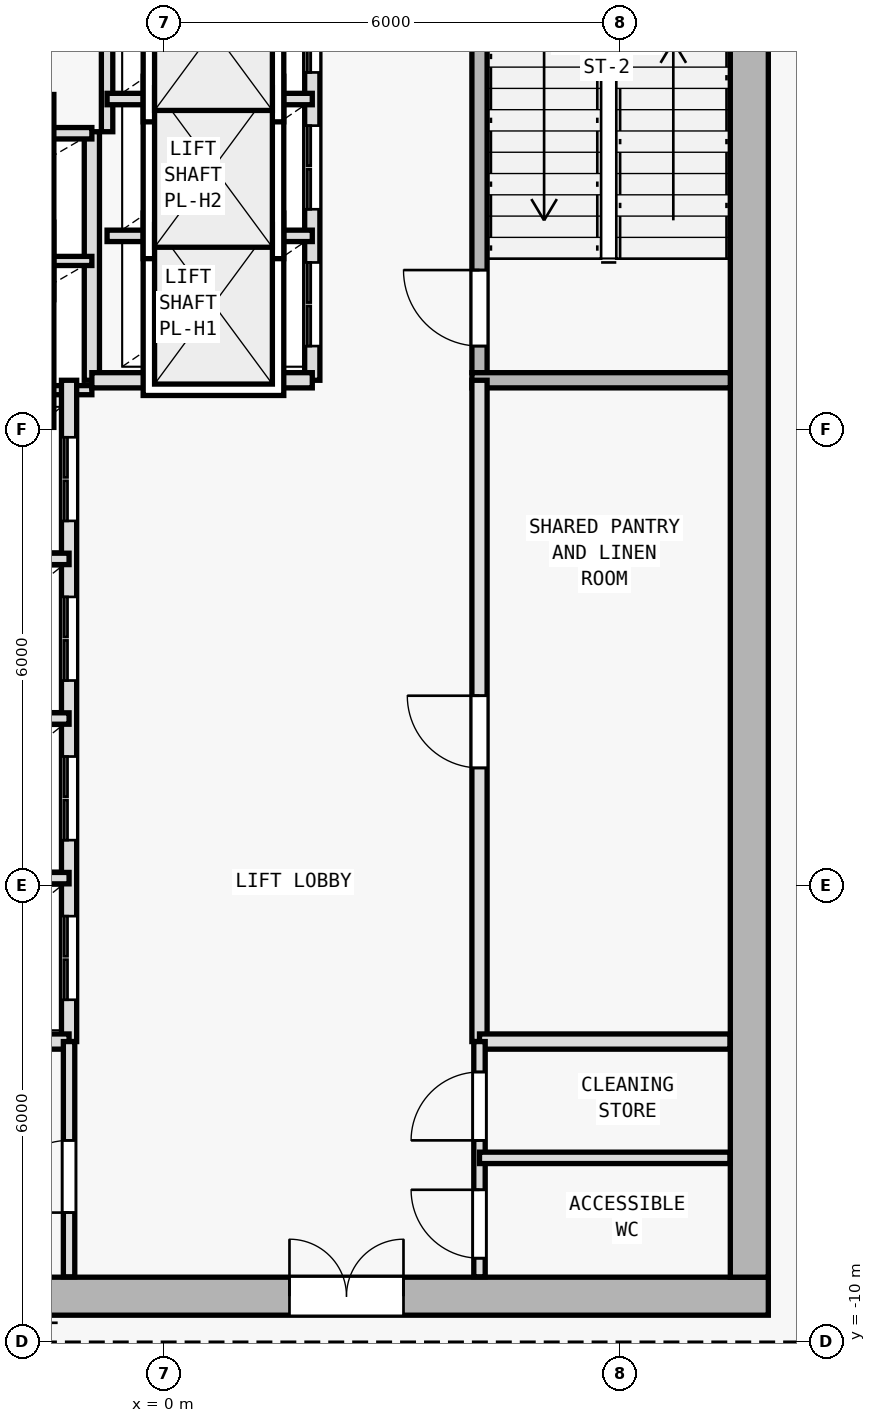
"""IFC4 building model, lengths in metres.
Left out: names, types, materials, properties, quantities, classifications, styles, units other than length and angle.
Written with IfcOpenShell. Run it as: python <this file> out.ifc"""

import sys

from ifc_helpers import new_model, si_unit, direction, frame, frame_2d, origin, origin_2d, place, context, subcontext, project, spatial, rectangle, i_section, extrude, element, fill, save


model = new_model("IFC4")
c1 = context("Model", 3, precision=1e-05, world=origin(), true_north=direction((0.0, 1.0)))
c2 = subcontext(c1, "Body", "Model", "MODEL_VIEW")
j1 = project(units=[si_unit("LENGTHUNIT", "METRE"), si_unit("PLANEANGLEUNIT", "RADIAN")], contexts=[c1])
p1 = place(None, origin())
s1 = spatial("IfcSite", under=j1, at=p1, CompositionType="ELEMENT")
p2 = place(p1, origin())
s2 = spatial("IfcBuilding", under=s1, at=p2, CompositionType="ELEMENT")
p3 = place(p2, frame((0.0, 0.0, 190.2)))
s3 = spatial("IfcBuildingStorey", under=s2, at=p3, CompositionType="ELEMENT", Elevation=190.2)
for number, where, z_axis, x_axis in (
    (1, (7.7, -9.4, 0.0), (0.0, 0.0, 1.0), (1.0, 0.0, 0.0)),
    (2, (0.0, -9.4, 0.0), (0.0, 0.0, 1.0), (1.0, 0.0, 0.0)),
    (3, (7.7, 0.4, 0.0), (0.0, 0.0, 1.0), (1.0, 0.0, 0.0)),
):
    element("IfcColumn", number, at=place(p3, frame(where, z_axis=z_axis, x_axis=x_axis)), inside=s3, PredefinedType="COLUMN", context=c2, shape_type="SweptSolid", body=[
        extrude(i_section(OverallWidth=0.404, OverallDepth=0.407, WebThickness=0.017, FlangeThickness=0.028, FilletRadius=0.015, at=origin_2d()), origin(), (0.0, 0.0, 1.0), 4.5),
    ])
p4 = place(p3, frame((-7.95, -9.4, 0.0), z_axis=(0.0, 0.0, 1.0), x_axis=(1.0, 0.0, 0.0)))
e4 = element("IfcWall", 4, at=p4, inside=s3, PredefinedType="SHEAR", context=c2, shape_type="SweptSolid", body=[
    extrude(rectangle(XDim=15.9, YDim=0.5, at=frame_2d((7.95, 0.0))), origin(), (0.0, 0.0, 1.0), 4.25),
])
p5 = place(p4, frame((9.6, 0.0, 0.0)))
e5 = element("IfcOpeningElement", 5, at=p5, cuts=e4, PredefinedType="OPENING", context=c2, shape_type="SweptSolid", body=[
    extrude(rectangle(XDim=1.5, YDim=2.2, at=frame_2d((0.75, 1.1))), frame((0.0, 0.26, 0.0), z_axis=(0.0, -1.0, 0.0), x_axis=(1.0, 0.0, 0.0)), (0.0, 0.0, 1.0), 0.52),
])
p6 = place(p3, frame((7.7, 9.95, 0.0), z_axis=(0.0, 0.0, 1.0), x_axis=(0.0, -1.0, 0.0)))
e6 = element("IfcWall", 6, at=p6, inside=s3, PredefinedType="SHEAR", context=c2, shape_type="SweptSolid", body=[
    extrude(rectangle(XDim=19.1, YDim=0.5, at=frame_2d((9.55, 0.0))), origin(), (0.0, 0.0, 1.0), 4.25),
])
p7 = place(p3, frame((4.15, 2.75, 0.0), z_axis=(0.0, 0.0, 1.0), x_axis=(0.0, 1.0, 0.0)))
e7 = element("IfcWall", 7, at=p7, inside=s3, PredefinedType="SOLIDWALL", context=c2, shape_type="SweptSolid", body=[
    extrude(rectangle(XDim=7.2, YDim=0.2, at=frame_2d((3.6, 0.0))), origin(), (0.0, 0.0, 1.0), 4.25),
])
p8 = place(p7, frame((0.35, 0.0, 0.0)))
e8 = element("IfcOpeningElement", 8, at=p8, cuts=e7, PredefinedType="OPENING", context=c2, shape_type="SweptSolid", body=[
    extrude(rectangle(XDim=1.0, YDim=2.15, at=frame_2d((0.5, 1.075))), frame((0.0, 0.11, 0.0), z_axis=(0.0, -1.0, 0.0), x_axis=(1.0, 0.0, 0.0)), (0.0, 0.0, 1.0), 0.22),
])
p9 = place(p3, frame((4.05, 2.65, 0.0), z_axis=(0.0, 0.0, 1.0), x_axis=(1.0, 0.0, 0.0)))
e9 = element("IfcWall", 9, at=p9, inside=s3, PredefinedType="SOLIDWALL", context=c2, shape_type="SweptSolid", body=[
    extrude(rectangle(XDim=3.4, YDim=0.2, at=frame_2d((1.7, 0.0))), origin(), (0.0, 0.0, 1.0), 4.25),
])
p10 = place(p3, frame((-0.95, 2.65, 0.0), z_axis=(0.0, 0.0, 1.0), x_axis=(0.0, 1.0, 0.0)))
e10 = element("IfcWall", 10, at=p10, inside=s3, PredefinedType="SOLIDWALL", context=c2, shape_type="SweptSolid", body=[
    extrude(rectangle(XDim=3.27, YDim=0.2, at=frame_2d((1.635, 0.0))), origin(), (0.0, 0.0, 1.0), 4.25),
])
for number, where, z_axis, x_axis in (
    (11, (-3.85, 2.52, 0.0), (0.0, 0.0, 1.0), (1.0, 0.0, 0.0)),
    (12, (-3.85, 4.22, 0.0), (0.0, 0.0, 1.0), (1.0, 0.0, 0.0)),
):
    element("IfcWall", number, at=place(p3, frame(where, z_axis=z_axis, x_axis=x_axis)), inside=s3, PredefinedType="PARTITIONING", context=c2, shape_type="SweptSolid", body=[
        extrude(rectangle(XDim=2.9, YDim=0.12, at=frame_2d((1.45, 0.0))), origin(), (0.0, 0.0, 1.0), 4.25),
    ])
p11 = place(p3, frame((-3.85, 5.9, 0.0), z_axis=(0.0, 0.0, 1.0), x_axis=(1.0, 0.0, 0.0)))
e13 = element("IfcWall", 13, at=p11, inside=s3, PredefinedType="PARTITIONING", context=c2, shape_type="SweptSolid", body=[
    extrude(rectangle(XDim=2.9, YDim=0.15, at=frame_2d((1.45, 0.0))), origin(), (0.0, 0.0, 1.0), 4.25),
])
p12 = place(p3, frame((4.15, -6.05, 0.0), z_axis=(0.0, 0.0, 1.0), x_axis=(0.0, 1.0, 0.0)))
e14 = element("IfcWall", 14, at=p12, inside=s3, PredefinedType="SOLIDWALL", context=c2, shape_type="SweptSolid", body=[
    extrude(rectangle(XDim=8.7, YDim=0.2, at=frame_2d((4.35, 0.0))), origin(), (0.0, 0.0, 1.0), 4.25),
])
p13 = place(p12, frame((3.6, 0.0, 0.0)))
e15 = element("IfcOpeningElement", 15, at=p13, cuts=e14, PredefinedType="OPENING", context=c2, shape_type="SweptSolid", body=[
    extrude(rectangle(XDim=0.95, YDim=2.1, at=frame_2d((0.475, 1.05))), frame((0.0, 0.11, 0.0), z_axis=(0.0, -1.0, 0.0), x_axis=(1.0, 0.0, 0.0)), (0.0, 0.0, 1.0), 0.22),
])
p14 = place(p3, frame((-1.25, -6.05, 0.0), z_axis=(0.0, 0.0, 1.0), x_axis=(0.0, 1.0, 0.0)))
e16 = element("IfcWall", 16, at=p14, inside=s3, PredefinedType="SOLIDWALL", context=c2, shape_type="SweptSolid", body=[
    extrude(rectangle(XDim=8.7, YDim=0.2, at=frame_2d((4.35, 0.0))), origin(), (0.0, 0.0, 1.0), 4.25),
])
p15 = place(p14, frame((0.55, 0.0, 0.0)))
e17 = element("IfcOpeningElement", 17, at=p15, cuts=e16, PredefinedType="OPENING", context=c2, shape_type="SweptSolid", body=[
    extrude(rectangle(XDim=1.1, YDim=2.15, at=frame_2d((0.55, 1.075))), frame((0.0, 0.11, 0.0), z_axis=(0.0, -1.0, 0.0), x_axis=(1.0, 0.0, 0.0)), (0.0, 0.0, 1.0), 0.22),
])
p16 = place(p14, frame((2.65, 0.0, 0.0)))
e18 = element("IfcOpeningElement", 18, at=p16, cuts=e16, PredefinedType="OPENING", context=c2, shape_type="SweptSolid", body=[
    extrude(rectangle(XDim=1.1, YDim=2.15, at=frame_2d((0.55, 1.075))), frame((0.0, 0.11, 0.0), z_axis=(0.0, -1.0, 0.0), x_axis=(1.0, 0.0, 0.0)), (0.0, 0.0, 1.0), 0.22),
])
p17 = place(p14, frame((4.75, 0.0, 0.0)))
e19 = element("IfcOpeningElement", 19, at=p17, cuts=e16, PredefinedType="OPENING", context=c2, shape_type="SweptSolid", body=[
    extrude(rectangle(XDim=1.1, YDim=2.15, at=frame_2d((0.55, 1.075))), frame((0.0, 0.11, 0.0), z_axis=(0.0, -1.0, 0.0), x_axis=(1.0, 0.0, 0.0)), (0.0, 0.0, 1.0), 0.22),
])
p18 = place(p14, frame((6.85, 0.0, 0.0)))
e20 = element("IfcOpeningElement", 20, at=p18, cuts=e16, PredefinedType="OPENING", context=c2, shape_type="SweptSolid", body=[
    extrude(rectangle(XDim=1.1, YDim=2.15, at=frame_2d((0.55, 1.075))), frame((0.0, 0.11, 0.0), z_axis=(0.0, -1.0, 0.0), x_axis=(1.0, 0.0, 0.0)), (0.0, 0.0, 1.0), 0.22),
])
for number, where, z_axis, x_axis in (
    (21, (-4.15, -3.9, 0.0), (0.0, 0.0, 1.0), (1.0, 0.0, 0.0)),
    (22, (-4.15, -1.8, 0.0), (0.0, 0.0, 1.0), (1.0, 0.0, 0.0)),
    (23, (-4.15, 0.3, 0.0), (0.0, 0.0, 1.0), (1.0, 0.0, 0.0)),
):
    element("IfcWall", number, at=place(p3, frame(where, z_axis=z_axis, x_axis=x_axis)), inside=s3, PredefinedType="PARTITIONING", context=c2, shape_type="SweptSolid", body=[
        extrude(rectangle(XDim=2.9, YDim=0.15, at=frame_2d((1.45, 0.0))), origin(), (0.0, 0.0, 1.0), 4.25),
    ])
p19 = place(p3, frame((1.95, 2.65, 0.0), z_axis=(0.0, 0.0, 1.0), x_axis=(0.0, 1.0, 0.0)))
e24 = element("IfcWall", 24, at=p19, inside=s3, PredefinedType="SOLIDWALL", context=c2, shape_type="SweptSolid", body=[
    extrude(rectangle(XDim=7.295, YDim=0.2, at=frame_2d((3.647, 0.0))), origin(), (0.0, 0.0, 1.0), 4.25),
])
p20 = place(p19, frame((0.45, 0.0, 0.0)))
e25 = element("IfcOpeningElement", 25, at=p20, cuts=e24, PredefinedType="OPENING", context=c2, shape_type="SweptSolid", body=[
    extrude(rectangle(XDim=1.1, YDim=2.15, at=frame_2d((0.55, 1.075))), frame((0.0, 0.11, 0.0), z_axis=(0.0, -1.0, 0.0), x_axis=(1.0, 0.0, 0.0)), (0.0, 0.0, 1.0), 0.22),
])
p21 = place(p19, frame((2.25, 0.0, 0.0)))
e26 = element("IfcOpeningElement", 26, at=p21, cuts=e24, PredefinedType="OPENING", context=c2, shape_type="SweptSolid", body=[
    extrude(rectangle(XDim=1.1, YDim=2.15, at=frame_2d((0.55, 1.075))), frame((0.0, 0.11, 0.0), z_axis=(0.0, -1.0, 0.0), x_axis=(1.0, 0.0, 0.0)), (0.0, 0.0, 1.0), 0.22),
])
p22 = place(p19, frame((4.05, 0.0, 0.0)))
e27 = element("IfcOpeningElement", 27, at=p22, cuts=e24, PredefinedType="OPENING", context=c2, shape_type="SweptSolid", body=[
    extrude(rectangle(XDim=1.1, YDim=2.15, at=frame_2d((0.55, 1.075))), frame((0.0, 0.11, 0.0), z_axis=(0.0, -1.0, 0.0), x_axis=(1.0, 0.0, 0.0)), (0.0, 0.0, 1.0), 0.22),
])
p23 = place(p19, frame((5.85, 0.0, 0.0)))
e28 = element("IfcOpeningElement", 28, at=p23, cuts=e24, PredefinedType="OPENING", context=c2, shape_type="SweptSolid", body=[
    extrude(rectangle(XDim=1.1, YDim=2.15, at=frame_2d((0.55, 1.075))), frame((0.0, 0.11, 0.0), z_axis=(0.0, -1.0, 0.0), x_axis=(1.0, 0.0, 0.0)), (0.0, 0.0, 1.0), 0.22),
])
p24 = place(p3, frame((-0.95, 2.65, 0.0), z_axis=(0.0, 0.0, 1.0), x_axis=(1.0, 0.0, 0.0)))
e29 = element("IfcWall", 29, at=p24, inside=s3, PredefinedType="SOLIDWALL", context=c2, shape_type="SweptSolid", body=[
    extrude(rectangle(XDim=2.9, YDim=0.2, at=frame_2d((1.45, 0.0))), origin(), (0.0, 0.0, 1.0), 4.25),
])
p25 = place(p3, frame((-0.75, 5.92, 0.0), z_axis=(0.0, 0.0, 1.0), x_axis=(0.0, 1.0, 0.0)))
e30 = element("IfcWall", 30, at=p25, inside=s3, PredefinedType="PARTITIONING", context=c2, shape_type="SweptSolid", body=[
    extrude(rectangle(XDim=4.025, YDim=0.15, at=frame_2d((2.013, 0.0))), origin(), (0.0, 0.0, 1.0), 4.25),
])
for number, where, z_axis, x_axis in (
    (31, (-0.75, 4.55, 0.0), (0.0, 0.0, 1.0), (1.0, 0.0, 0.0)),
    (32, (-0.75, 6.35, 0.0), (0.0, 0.0, 1.0), (1.0, 0.0, 0.0)),
):
    element("IfcWall", number, at=place(p3, frame(where, z_axis=z_axis, x_axis=x_axis)), inside=s3, PredefinedType="PARTITIONING", context=c2, shape_type="SweptSolid", body=[
        extrude(rectangle(XDim=2.7, YDim=0.15, at=frame_2d((1.35, 0.0))), origin(), (0.0, 0.0, 1.0), 4.25),
    ])
p26 = place(p3, frame((-4.04, -6.05, 0.0), z_axis=(0.0, 0.0, 1.0), x_axis=(1.0, 0.0, 0.0)))
e33 = element("IfcWall", 33, at=p26, inside=s3, PredefinedType="SOLIDWALL", context=c2, shape_type="SweptSolid", body=[
    extrude(rectangle(XDim=2.79, YDim=0.2, at=frame_2d((1.395, 0.0))), origin(), (0.0, 0.0, 1.0), 4.25),
])
p27 = place(p3, frame((4.15, -6.05, 0.0), z_axis=(0.0, 0.0, 1.0), x_axis=(1.0, 0.0, 0.0)))
e34 = element("IfcWall", 34, at=p27, inside=s3, PredefinedType="SOLIDWALL", context=c2, shape_type="SweptSolid", body=[
    extrude(rectangle(XDim=3.295, YDim=0.2, at=frame_2d((1.647, 0.0))), origin(), (0.0, 0.0, 1.0), 4.25),
])
p28 = place(p3, frame((-1.25, -9.145, 0.0), z_axis=(0.0, 0.0, 1.0), x_axis=(0.0, 1.0, 0.0)))
e35 = element("IfcWall", 35, at=p28, inside=s3, PredefinedType="PARTITIONING", context=c2, shape_type="SweptSolid", body=[
    extrude(rectangle(XDim=3.095, YDim=0.15, at=frame_2d((1.547, 0.0))), origin(), (0.0, 0.0, 1.0), 4.25),
])
p29 = place(p28, frame((0.845, 0.0, 0.0)))
e36 = element("IfcOpeningElement", 36, at=p29, cuts=e35, PredefinedType="OPENING", context=c2, shape_type="SweptSolid", body=[
    extrude(rectangle(XDim=0.95, YDim=2.1, at=frame_2d((0.475, 1.05))), frame((0.0, 0.085, 0.0), z_axis=(0.0, -1.0, 0.0), x_axis=(1.0, 0.0, 0.0)), (0.0, 0.0, 1.0), 0.17),
])
p30 = place(p3, frame((4.15, -9.145, 0.0), z_axis=(0.0, 0.0, 1.0), x_axis=(0.0, 1.0, 0.0)))
e37 = element("IfcWall", 37, at=p30, inside=s3, PredefinedType="PARTITIONING", context=c2, shape_type="SweptSolid", body=[
    extrude(rectangle(XDim=3.095, YDim=0.15, at=frame_2d((1.547, 0.0))), origin(), (0.0, 0.0, 1.0), 4.25),
])
p31 = place(p30, frame((0.245, 0.0, 0.0)))
e38 = element("IfcOpeningElement", 38, at=p31, cuts=e37, PredefinedType="OPENING", context=c2, shape_type="SweptSolid", body=[
    extrude(rectangle(XDim=0.9, YDim=2.1, at=frame_2d((0.45, 1.05))), frame((0.0, 0.085, 0.0), z_axis=(0.0, -1.0, 0.0), x_axis=(1.0, 0.0, 0.0)), (0.0, 0.0, 1.0), 0.17),
])
p32 = place(p30, frame((1.795, 0.0, 0.0)))
e39 = element("IfcOpeningElement", 39, at=p32, cuts=e37, PredefinedType="OPENING", context=c2, shape_type="SweptSolid", body=[
    extrude(rectangle(XDim=0.9, YDim=2.1, at=frame_2d((0.45, 1.05))), frame((0.0, 0.085, 0.0), z_axis=(0.0, -1.0, 0.0), x_axis=(1.0, 0.0, 0.0)), (0.0, 0.0, 1.0), 0.17),
])
p33 = place(p3, frame((4.15, -7.58, 0.0), z_axis=(0.0, 0.0, 1.0), x_axis=(1.0, 0.0, 0.0)))
e40 = element("IfcWall", 40, at=p33, inside=s3, PredefinedType="PARTITIONING", context=c2, shape_type="SweptSolid", body=[
    extrude(rectangle(XDim=3.295, YDim=0.15, at=frame_2d((1.647, 0.0))), origin(), (0.0, 0.0, 1.0), 4.25),
])
p34 = place(p5, origin())
e41 = element("IfcDoor", 41, at=p34, inside=s3, OperationType="DOUBLE_DOOR_SINGLE_SWING", PredefinedType="DOOR", context=c2, shape_type="SweptSolid", body=[
    extrude(rectangle(XDim=1.5, YDim=2.2, at=frame_2d((0.75, 1.1))), frame((0.0, 0.025, 0.0), z_axis=(0.0, -1.0, 0.0), x_axis=(1.0, 0.0, 0.0)), (0.0, 0.0, 1.0), 0.05),
])
fill(e5, e41)
p35 = place(p8, origin())
e42 = element("IfcDoor", 42, at=p35, inside=s3, OperationType="SINGLE_SWING_RIGHT", PredefinedType="DOOR", context=c2, shape_type="SweptSolid", body=[
    extrude(rectangle(XDim=1.0, YDim=2.15, at=frame_2d((0.5, 1.075))), frame((0.0, 0.025, 0.0), z_axis=(0.0, -1.0, 0.0), x_axis=(1.0, 0.0, 0.0)), (0.0, 0.0, 1.0), 0.05),
])
fill(e8, e42)
p36 = place(p13, origin())
e43 = element("IfcDoor", 43, at=p36, inside=s3, OperationType="SINGLE_SWING_RIGHT", PredefinedType="DOOR", context=c2, shape_type="SweptSolid", body=[
    extrude(rectangle(XDim=0.95, YDim=2.1, at=frame_2d((0.475, 1.05))), frame((0.0, 0.025, 0.0), z_axis=(0.0, -1.0, 0.0), x_axis=(1.0, 0.0, 0.0)), (0.0, 0.0, 1.0), 0.05),
])
fill(e15, e43)
p37 = place(p15, origin())
e44 = element("IfcDoor", 44, at=p37, inside=s3, OperationType="DOUBLE_DOOR_SLIDING", PredefinedType="DOOR", context=c2, shape_type="SweptSolid", body=[
    extrude(rectangle(XDim=1.1, YDim=2.15, at=frame_2d((0.55, 1.075))), frame((0.0, 0.025, 0.0), z_axis=(0.0, -1.0, 0.0), x_axis=(1.0, 0.0, 0.0)), (0.0, 0.0, 1.0), 0.05),
])
fill(e17, e44)
p38 = place(p16, origin())
e45 = element("IfcDoor", 45, at=p38, inside=s3, OperationType="DOUBLE_DOOR_SLIDING", PredefinedType="DOOR", context=c2, shape_type="SweptSolid", body=[
    extrude(rectangle(XDim=1.1, YDim=2.15, at=frame_2d((0.55, 1.075))), frame((0.0, 0.025, 0.0), z_axis=(0.0, -1.0, 0.0), x_axis=(1.0, 0.0, 0.0)), (0.0, 0.0, 1.0), 0.05),
])
fill(e18, e45)
p39 = place(p17, origin())
e46 = element("IfcDoor", 46, at=p39, inside=s3, OperationType="DOUBLE_DOOR_SLIDING", PredefinedType="DOOR", context=c2, shape_type="SweptSolid", body=[
    extrude(rectangle(XDim=1.1, YDim=2.15, at=frame_2d((0.55, 1.075))), frame((0.0, 0.025, 0.0), z_axis=(0.0, -1.0, 0.0), x_axis=(1.0, 0.0, 0.0)), (0.0, 0.0, 1.0), 0.05),
])
fill(e19, e46)
p40 = place(p18, origin())
e47 = element("IfcDoor", 47, at=p40, inside=s3, OperationType="DOUBLE_DOOR_SLIDING", PredefinedType="DOOR", context=c2, shape_type="SweptSolid", body=[
    extrude(rectangle(XDim=1.1, YDim=2.15, at=frame_2d((0.55, 1.075))), frame((0.0, 0.025, 0.0), z_axis=(0.0, -1.0, 0.0), x_axis=(1.0, 0.0, 0.0)), (0.0, 0.0, 1.0), 0.05),
])
fill(e20, e47)
p41 = place(p20, origin())
e48 = element("IfcDoor", 48, at=p41, inside=s3, OperationType="DOUBLE_DOOR_SLIDING", PredefinedType="DOOR", context=c2, shape_type="SweptSolid", body=[
    extrude(rectangle(XDim=1.1, YDim=2.15, at=frame_2d((0.55, 1.075))), frame((0.0, 0.025, 0.0), z_axis=(0.0, -1.0, 0.0), x_axis=(1.0, 0.0, 0.0)), (0.0, 0.0, 1.0), 0.05),
])
fill(e25, e48)
p42 = place(p21, origin())
e49 = element("IfcDoor", 49, at=p42, inside=s3, OperationType="DOUBLE_DOOR_SLIDING", PredefinedType="DOOR", context=c2, shape_type="SweptSolid", body=[
    extrude(rectangle(XDim=1.1, YDim=2.15, at=frame_2d((0.55, 1.075))), frame((0.0, 0.025, 0.0), z_axis=(0.0, -1.0, 0.0), x_axis=(1.0, 0.0, 0.0)), (0.0, 0.0, 1.0), 0.05),
])
fill(e26, e49)
p43 = place(p22, origin())
e50 = element("IfcDoor", 50, at=p43, inside=s3, OperationType="DOUBLE_DOOR_SLIDING", PredefinedType="DOOR", context=c2, shape_type="SweptSolid", body=[
    extrude(rectangle(XDim=1.1, YDim=2.15, at=frame_2d((0.55, 1.075))), frame((0.0, 0.025, 0.0), z_axis=(0.0, -1.0, 0.0), x_axis=(1.0, 0.0, 0.0)), (0.0, 0.0, 1.0), 0.05),
])
fill(e27, e50)
p44 = place(p29, origin())
e51 = element("IfcDoor", 51, at=p44, inside=s3, OperationType="SINGLE_SWING_LEFT", PredefinedType="DOOR", context=c2, shape_type="SweptSolid", body=[
    extrude(rectangle(XDim=0.95, YDim=2.1, at=frame_2d((0.475, 1.05))), frame((0.0, 0.025, 0.0), z_axis=(0.0, -1.0, 0.0), x_axis=(1.0, 0.0, 0.0)), (0.0, 0.0, 1.0), 0.05),
])
fill(e36, e51)
p45 = place(p31, origin())
e52 = element("IfcDoor", 52, at=p45, inside=s3, OperationType="SINGLE_SWING_RIGHT", PredefinedType="DOOR", context=c2, shape_type="SweptSolid", body=[
    extrude(rectangle(XDim=0.9, YDim=2.1, at=frame_2d((0.45, 1.05))), frame((0.0, 0.025, 0.0), z_axis=(0.0, -1.0, 0.0), x_axis=(1.0, 0.0, 0.0)), (0.0, 0.0, 1.0), 0.05),
])
fill(e38, e52)
p46 = place(p32, origin())
e53 = element("IfcDoor", 53, at=p46, inside=s3, OperationType="SINGLE_SWING_LEFT", PredefinedType="DOOR", context=c2, shape_type="SweptSolid", body=[
    extrude(rectangle(XDim=0.9, YDim=2.1, at=frame_2d((0.45, 1.05))), frame((0.0, 0.025, 0.0), z_axis=(0.0, -1.0, 0.0), x_axis=(1.0, 0.0, 0.0)), (0.0, 0.0, 1.0), 0.05),
])
fill(e39, e53)
save(model, sys.argv[1])
